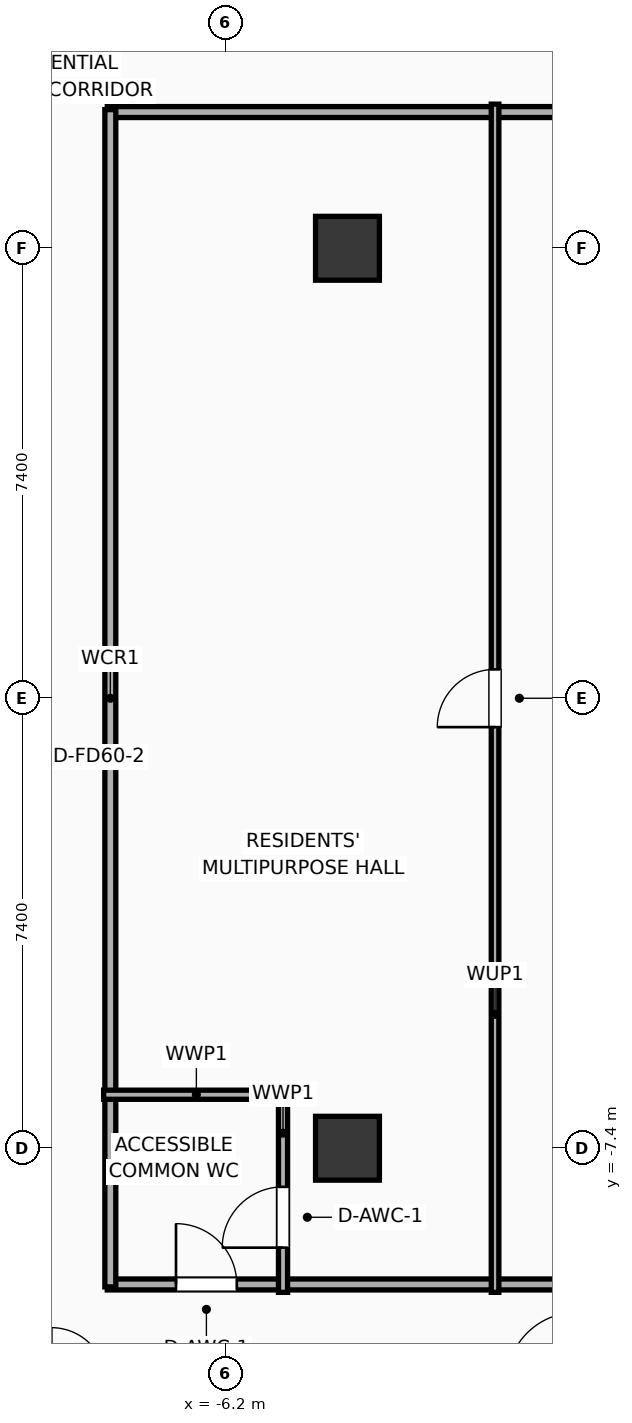
"""IFC4 building model, lengths in metres.
Left out: names, types, materials, properties, quantities, classifications, styles, units other than length and angle.
Written with IfcOpenShell. Run it as: python <this file> out.ifc"""

import sys

from ifc_helpers import new_model, si_unit, direction, frame, frame_2d, origin, origin_2d, place, context, subcontext, project, spatial, rectangle, extrude, element, fill, save


model = new_model("IFC4")
c1 = context("Model", 3, precision=1e-05, world=origin(), true_north=direction((0.0, 1.0)))
c2 = subcontext(c1, "Body", "Model", "MODEL_VIEW")
j1 = project(units=[si_unit("LENGTHUNIT", "METRE"), si_unit("PLANEANGLEUNIT", "RADIAN")], contexts=[c1])
p1 = place(None, origin())
s1 = spatial("IfcSite", under=j1, at=p1, CompositionType="ELEMENT")
p2 = place(p1, origin())
s2 = spatial("IfcBuilding", under=s1, at=p2, CompositionType="ELEMENT")
p3 = place(p2, frame((0.0, 0.0, 76.7)))
s3 = spatial("IfcBuildingStorey", under=s2, at=p3, CompositionType="ELEMENT", Elevation=76.7)
for number, where, z_axis, x_axis in (
    (1, (-4.2, -7.4, 0.0), (0.0, 0.0, 1.0), (1.0, 0.0, 0.0)),
    (2, (-4.2, 7.4, 0.0), (0.0, 0.0, 1.0), (1.0, 0.0, 0.0)),
):
    element("IfcColumn", number, at=place(p3, frame(where, z_axis=z_axis, x_axis=x_axis)), inside=s3, PredefinedType="COLUMN", context=c2, shape_type="SweptSolid", body=[
        extrude(rectangle(XDim=1.05, YDim=1.05, at=origin_2d()), origin(), (0.0, 0.0, 1.0), 3.9),
    ])
p4 = place(p3, frame((-8.15, 9.64, 0.0), z_axis=(0.0, 0.0, 1.0), x_axis=(1.0, 0.0, 0.0)))
e3 = element("IfcWall", 3, at=p4, inside=s3, PredefinedType="PARTITIONING", context=c2, shape_type="SweptSolid", body=[
    extrude(rectangle(XDim=16.3, YDim=0.18, at=frame_2d((8.15, 0.0))), origin(), (0.0, 0.0, 1.0), 3.6),
])
p5 = place(p4, frame((8.49, 0.0, 0.0)))
e4 = element("IfcOpeningElement", 4, at=p5, cuts=e3, PredefinedType="OPENING", context=c2, shape_type="SweptSolid", body=[
    extrude(rectangle(XDim=0.95, YDim=2.05, at=frame_2d((0.475, 1.025))), frame((0.0, 0.1, 0.0), z_axis=(0.0, -1.0, 0.0), x_axis=(1.0, 0.0, 0.0)), (0.0, 0.0, 1.0), 0.2),
])
p6 = place(p3, frame((-8.15, -9.64, 0.0), z_axis=(0.0, 0.0, 1.0), x_axis=(1.0, 0.0, 0.0)))
e5 = element("IfcWall", 5, at=p6, inside=s3, PredefinedType="PARTITIONING", context=c2, shape_type="SweptSolid", body=[
    extrude(rectangle(XDim=16.3, YDim=0.18, at=frame_2d((8.15, 0.0))), origin(), (0.0, 0.0, 1.0), 3.6),
])
p7 = place(p6, frame((1.13, 0.0, 0.0)))
e6 = element("IfcOpeningElement", 6, at=p7, cuts=e5, PredefinedType="OPENING", context=c2, shape_type="SweptSolid", body=[
    extrude(rectangle(XDim=1.0, YDim=2.05, at=frame_2d((0.5, 1.025))), frame((0.0, 0.1, 0.0), z_axis=(0.0, -1.0, 0.0), x_axis=(1.0, 0.0, 0.0)), (0.0, 0.0, 1.0), 0.2),
])
p8 = place(p6, frame((10.12, 0.0, 0.0)))
e7 = element("IfcOpeningElement", 7, at=p8, cuts=e5, PredefinedType="OPENING", context=c2, shape_type="SweptSolid", body=[
    extrude(rectangle(XDim=0.95, YDim=2.05, at=frame_2d((0.475, 1.025))), frame((0.0, 0.1, 0.0), z_axis=(0.0, -1.0, 0.0), x_axis=(1.0, 0.0, 0.0)), (0.0, 0.0, 1.0), 0.2),
])
p9 = place(p3, frame((-8.1, -9.68, 0.0), z_axis=(0.0, 0.0, 1.0), x_axis=(0.0, 1.0, 0.0)))
e8 = element("IfcWall", 8, at=p9, inside=s3, PredefinedType="PARTITIONING", context=c2, shape_type="SweptSolid", body=[
    extrude(rectangle(XDim=19.36, YDim=0.18, at=frame_2d((9.68, 0.0))), origin(), (0.0, 0.0, 1.0), 3.6),
])
p10 = place(p3, frame((-5.26, -9.77, 0.0), z_axis=(0.0, 0.0, 1.0), x_axis=(0.0, 1.0, 0.0)))
e9 = element("IfcWall", 9, at=p10, inside=s3, PredefinedType="PLUMBINGWALL", context=c2, shape_type="SweptSolid", body=[
    extrude(rectangle(XDim=3.35, YDim=0.15, at=frame_2d((1.675, 0.0))), origin(), (0.0, 0.0, 1.0), 3.6),
])
p11 = place(p10, frame((0.735, 0.0, 0.0)))
e10 = element("IfcOpeningElement", 10, at=p11, cuts=e9, PredefinedType="OPENING", context=c2, shape_type="SweptSolid", body=[
    extrude(rectangle(XDim=1.0, YDim=2.05, at=frame_2d((0.5, 1.025))), frame((0.0, 0.085, 0.0), z_axis=(0.0, -1.0, 0.0), x_axis=(1.0, 0.0, 0.0)), (0.0, 0.0, 1.0), 0.17),
])
p12 = place(p3, frame((-8.21, -6.52, 0.0), z_axis=(0.0, 0.0, 1.0), x_axis=(1.0, 0.0, 0.0)))
e11 = element("IfcWall", 11, at=p12, inside=s3, PredefinedType="PLUMBINGWALL", context=c2, shape_type="SweptSolid", body=[
    extrude(rectangle(XDim=3.05, YDim=0.15, at=frame_2d((1.525, 0.0))), origin(), (0.0, 0.0, 1.0), 3.6),
])
p13 = place(p3, frame((-1.773, -9.77, 0.0), z_axis=(0.0, 0.0, 1.0), x_axis=(0.0, 1.0, 0.0)))
e12 = element("IfcWall", 12, at=p13, inside=s3, PredefinedType="PARTITIONING", context=c2, shape_type="SweptSolid", body=[
    extrude(rectangle(XDim=19.54, YDim=0.125, at=frame_2d((9.77, 0.0))), origin(), (0.0, 0.0, 1.0), 3.6),
])
p14 = place(p13, frame((9.295, 0.0, 0.0)))
e13 = element("IfcOpeningElement", 13, at=p14, cuts=e12, PredefinedType="OPENING", context=c2, shape_type="SweptSolid", body=[
    extrude(rectangle(XDim=0.95, YDim=2.05, at=frame_2d((0.475, 1.025))), frame((0.0, 0.073, 0.0), z_axis=(0.0, -1.0, 0.0), x_axis=(1.0, 0.0, 0.0)), (0.0, 0.0, 1.0), 0.145),
])
p15 = place(p7, origin())
e14 = element("IfcDoor", 14, at=p15, inside=s3, OperationType="SINGLE_SWING_LEFT", PredefinedType="DOOR", context=c2, shape_type="SweptSolid", body=[
    extrude(rectangle(XDim=1.0, YDim=2.05, at=frame_2d((0.5, 1.025))), frame((0.0, 0.025, 0.0), z_axis=(0.0, -1.0, 0.0), x_axis=(1.0, 0.0, 0.0)), (0.0, 0.0, 1.0), 0.05),
])
fill(e6, e14)
p16 = place(p11, origin())
e15 = element("IfcDoor", 15, at=p16, inside=s3, OperationType="SINGLE_SWING_LEFT", PredefinedType="DOOR", context=c2, shape_type="SweptSolid", body=[
    extrude(rectangle(XDim=1.0, YDim=2.05, at=frame_2d((0.5, 1.025))), frame((0.0, 0.025, 0.0), z_axis=(0.0, -1.0, 0.0), x_axis=(1.0, 0.0, 0.0)), (0.0, 0.0, 1.0), 0.05),
])
fill(e10, e15)
p17 = place(p14, origin())
e16 = element("IfcDoor", 16, at=p17, inside=s3, OperationType="SINGLE_SWING_LEFT", PredefinedType="DOOR", context=c2, shape_type="SweptSolid", body=[
    extrude(rectangle(XDim=0.95, YDim=2.05, at=frame_2d((0.475, 1.025))), frame((0.0, 0.025, 0.0), z_axis=(0.0, -1.0, 0.0), x_axis=(1.0, 0.0, 0.0)), (0.0, 0.0, 1.0), 0.05),
])
fill(e13, e16)
save(model, sys.argv[1])
